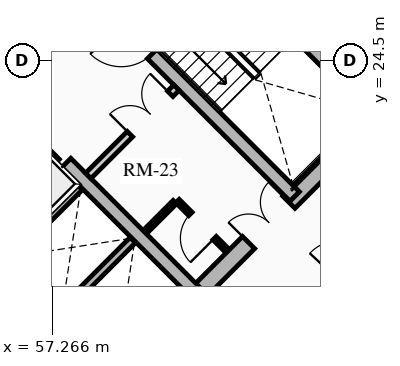
"""IFC4 building model, lengths in metres.
Left out: names, types, materials, properties, quantities, classifications, styles, units other than length and angle.
Written with IfcOpenShell. Run it as: python <this file> out.ifc"""

import sys

from ifc_helpers import new_model, si_unit, direction, frame, frame_2d, origin, place, context, subcontext, project, spatial, rectangle, extrude, source, transform, mapped, element, fill, save


model = new_model("IFC4")
c1 = context("Model", 3, precision=1e-05, world=origin(), true_north=direction((0.0, 1.0)))
c2 = subcontext(c1, "Body", "Model", "MODEL_VIEW")
j1 = project(units=[si_unit("LENGTHUNIT", "METRE"), si_unit("PLANEANGLEUNIT", "RADIAN")], contexts=[c1])
p1 = place(None, origin())
s1 = spatial("IfcSite", under=j1, at=p1, CompositionType="ELEMENT")
p2 = place(p1, origin())
s2 = spatial("IfcBuilding", under=s1, at=p2, CompositionType="ELEMENT")
p3 = place(p2, frame((0.0, 0.0, 78.88)))
s3 = spatial("IfcBuildingStorey", under=s2, at=p3, CompositionType="ELEMENT", Elevation=78.88)
for number, where, z_axis, x_axis in (
    (1, (58.737, 15.697, 0.0), (0.0, 0.0, 1.0), (-0.707, 0.707, 0.0)),
    (2, (66.303, 23.263, 0.0), (0.0, 0.0, 1.0), (-0.707, 0.707, 0.0)),
):
    element("IfcWall", number, at=place(p3, frame(where, z_axis=z_axis, x_axis=x_axis)), inside=s3, PredefinedType="SHEAR", context=c2, shape_type="SweptSolid", body=[
        extrude(rectangle(XDim=14.2, YDim=0.45, at=frame_2d((7.1, 0.0))), origin(), (0.0, 0.0, 1.0), 2.91),
    ])
p4 = place(p3, frame((58.578, 15.856, 0.0), z_axis=(0.0, 0.0, 1.0), x_axis=(0.707106781187, 0.707106781187, 0.0)))
e3 = element("IfcWall", 3, at=p4, inside=s3, PredefinedType="SHEAR", context=c2, shape_type="SweptSolid", body=[
    extrude(rectangle(XDim=10.7, YDim=0.45, at=frame_2d((5.35, 0.0))), origin(), (0.0, 0.0, 1.0), 2.91),
])
m1 = source(origin(), c2, "Body", "SweptSolid", [
    extrude(rectangle(XDim=1.5, YDim=2.02, at=frame_2d((0.75, 1.01))), frame((0.0, 0.235, 0.0), z_axis=(0.0, -1.0, 0.0), x_axis=(1.0, 0.0, 0.0)), (0.0, 0.0, 1.0), 0.47),
])
p5 = place(p4, frame((5.45, 0.0, 0.0)))
e4 = element("IfcOpeningElement", 4, at=p5, cuts=e3, PredefinedType="OPENING", context=c2, shape_type="MappedRepresentation", body=[
    mapped(m1, transform((0.0, 0.0, 0.0), x_axis=(1.0, 0.0, 0.0), y_axis=(0.0, 1.0, 0.0), z_axis=(0.0, 0.0, 1.0), scale=1.0)),
])
p6 = place(p3, frame((61.078, 18.355, 0.0), z_axis=(0.0, 0.0, 1.0), x_axis=(-0.707106781187, 0.707106781187, 0.0)))
e5 = element("IfcWall", 5, at=p6, inside=s3, PredefinedType="SHEAR", context=c2, shape_type="SweptSolid", body=[
    extrude(rectangle(XDim=13.75, YDim=0.35, at=frame_2d((6.875, 0.0))), origin(), (0.0, 0.0, 1.0), 2.91),
])
m2 = source(origin(), c2, "Body", "SweptSolid", [
    extrude(rectangle(XDim=1.1, YDim=2.015, at=frame_2d((0.55, 1.007))), frame((0.0, 0.185, 0.0), z_axis=(0.0, -1.0, 0.0), x_axis=(1.0, 0.0, 0.0)), (0.0, 0.0, 1.0), 0.37),
])
p7 = place(p6, frame((4.875, 0.0, 0.0)))
e6 = element("IfcOpeningElement", 6, at=p7, cuts=e5, PredefinedType="OPENING", context=c2, shape_type="MappedRepresentation", body=[
    mapped(m2, transform((0.0, 0.0, 0.0), x_axis=(1.0, 0.0, 0.0), y_axis=(0.0, 1.0, 0.0), z_axis=(0.0, 0.0, 1.0), scale=1.0)),
])
m3 = source(origin(), c2, "Body", "SweptSolid", [
    extrude(rectangle(XDim=1.15, YDim=2.02, at=frame_2d((0.575, 1.01))), frame((0.0, 0.185, 0.0), z_axis=(0.0, -1.0, 0.0), x_axis=(1.0, 0.0, 0.0)), (0.0, 0.0, 1.0), 0.37),
])
p8 = place(p6, frame((7.295, 0.0, 0.0)))
e7 = element("IfcOpeningElement", 7, at=p8, cuts=e5, PredefinedType="OPENING", context=c2, shape_type="MappedRepresentation", body=[
    mapped(m3, transform((0.0, 0.0, 0.0), x_axis=(1.0, 0.0, 0.0), y_axis=(0.0, 1.0, 0.0), z_axis=(0.0, 0.0, 1.0), scale=1.0)),
])
p9 = place(p3, frame((63.645, 20.922, 0.0), z_axis=(0.0, 0.0, 1.0), x_axis=(-0.707106781187, 0.707106781187, 0.0)))
e8 = element("IfcWall", 8, at=p9, inside=s3, PredefinedType="SHEAR", context=c2, shape_type="SweptSolid", body=[
    extrude(rectangle(XDim=13.75, YDim=0.35, at=frame_2d((6.875, 0.0))), origin(), (0.0, 0.0, 1.0), 2.91),
])
p10 = place(p9, frame((10.0, 0.0, 0.0)))
e9 = element("IfcOpeningElement", 9, at=p10, cuts=e8, PredefinedType="OPENING", context=c2, shape_type="MappedRepresentation", body=[
    mapped(m2, transform((0.0, 0.0, 0.0), x_axis=(1.0, 0.0, 0.0), y_axis=(0.0, 1.0, 0.0), z_axis=(0.0, 0.0, 1.0), scale=1.0)),
])
p11 = place(p9, frame((12.0, 0.0, 0.0)))
e10 = element("IfcOpeningElement", 10, at=p11, cuts=e8, PredefinedType="OPENING", context=c2, shape_type="MappedRepresentation", body=[
    mapped(m2, transform((0.0, 0.0, 0.0), x_axis=(1.0, 0.0, 0.0), y_axis=(0.0, 1.0, 0.0), z_axis=(0.0, 0.0, 1.0), scale=1.0)),
])
p12 = place(p9, frame((5.305, 0.0, 0.0)))
e11 = element("IfcOpeningElement", 11, at=p12, cuts=e8, PredefinedType="OPENING", context=c2, shape_type="MappedRepresentation", body=[
    mapped(m3, transform((0.0, 0.0, 0.0), x_axis=(1.0, 0.0, 0.0), y_axis=(0.0, 1.0, 0.0), z_axis=(0.0, 0.0, 1.0), scale=1.0)),
])
p13 = place(p3, frame((65.83, 23.107, 0.0), z_axis=(0.0, 0.0, 1.0), x_axis=(-0.707088616009, 0.707124945897, 0.0)))
e12 = element("IfcWall", 12, at=p13, inside=s3, PredefinedType="SHEAR", context=c2, shape_type="SweptSolid", body=[
    extrude(rectangle(XDim=6.72, YDim=0.35, at=frame_2d((3.36, 0.0))), origin(), (0.0, 0.0, 1.0), 2.91),
])
p14 = place(p3, frame((55.888, 19.069, 0.0), z_axis=(0.0, 0.0, 1.0), x_axis=(0.707106781187, 0.707106781187, 0.0)))
e13 = element("IfcWall", 13, at=p14, inside=s3, PredefinedType="SHEAR", context=c2, shape_type="SweptSolid", body=[
    extrude(rectangle(XDim=2.97, YDim=0.2, at=frame_2d((1.485, 0.0))), origin(), (0.0, 0.0, 1.0), 2.91),
])
p15 = place(p3, frame((57.284, 17.673, 0.0), z_axis=(0.0, 0.0, 1.0), x_axis=(0.707147878904, 0.70706568108, 0.0)))
e14 = element("IfcWall", 14, at=p15, inside=s3, PredefinedType="SHEAR", context=c2, shape_type="SweptSolid", body=[
    extrude(rectangle(XDim=2.97, YDim=0.2, at=frame_2d((1.485, 0.0))), origin(), (0.0, 0.0, 1.0), 2.91),
])
p16 = place(p3, frame((57.412, 17.97, 0.0), z_axis=(0.0, 0.0, 1.0), x_axis=(-0.707106781187, 0.707106781187, 0.0)))
e15 = element("IfcWall", 15, at=p16, inside=s3, PredefinedType="SHEAR", context=c2, shape_type="SweptSolid", body=[
    extrude(rectangle(XDim=1.735, YDim=0.2, at=frame_2d((0.867, 0.0))), origin(), (0.0, 0.0, 1.0), 2.91),
])
p17 = place(p3, frame((58.214, 21.467, 0.0), z_axis=(0.0, 0.0, 1.0), x_axis=(0.707106781187, 0.707106781187, 0.0)))
e16 = element("IfcWall", 16, at=p17, inside=s3, PredefinedType="PARTITIONING", context=c2, shape_type="SweptSolid", body=[
    extrude(rectangle(XDim=3.28, YDim=0.2, at=frame_2d((1.64, 0.0))), origin(), (0.0, 0.0, 1.0), 2.655),
])
m4 = source(origin(), c2, "Body", "SweptSolid", [
    extrude(rectangle(XDim=1.5, YDim=2.02, at=frame_2d((0.75, 1.01))), frame((0.0, 0.11, 0.0), z_axis=(0.0, -1.0, 0.0), x_axis=(1.0, 0.0, 0.0)), (0.0, 0.0, 1.0), 0.22),
])
p18 = place(p17, frame((1.55, 0.0, 0.0)))
e17 = element("IfcOpeningElement", 17, at=p18, cuts=e16, PredefinedType="OPENING", context=c2, shape_type="MappedRepresentation", body=[
    mapped(m4, transform((0.0, 0.0, 0.0), x_axis=(1.0, 0.0, 0.0), y_axis=(0.0, 1.0, 0.0), z_axis=(0.0, 0.0, 1.0), scale=1.0)),
])
p19 = place(p3, frame((54.961, 24.719, 0.0), z_axis=(0.0, 0.0, 1.0), x_axis=(0.707106781187, 0.707106781187, 0.0)))
e18 = element("IfcWall", 18, at=p19, inside=s3, PredefinedType="PARTITIONING", context=c2, shape_type="SweptSolid", body=[
    extrude(rectangle(XDim=3.28, YDim=0.2, at=frame_2d((1.64, 0.0))), origin(), (0.0, 0.0, 1.0), 2.655),
])
m5 = source(origin(), c2, "Body", "SweptSolid", [
    extrude(rectangle(XDim=0.9, YDim=2.005, at=frame_2d((0.45, 1.002))), frame((0.0, 0.11, 0.0), z_axis=(0.0, -1.0, 0.0), x_axis=(1.0, 0.0, 0.0)), (0.0, 0.0, 1.0), 0.22),
])
p20 = place(p19, frame((0.16, 0.0, 0.0)))
e19 = element("IfcOpeningElement", 19, at=p20, cuts=e18, PredefinedType="OPENING", context=c2, shape_type="MappedRepresentation", body=[
    mapped(m5, transform((0.0, 0.0, 0.0), x_axis=(1.0, 0.0, 0.0), y_axis=(0.0, 1.0, 0.0), z_axis=(0.0, 0.0, 1.0), scale=1.0)),
])
p21 = place(p3, frame((61.835, 19.529, 0.0), z_axis=(0.0, 0.0, 1.0), x_axis=(-0.707174592913, 0.707038962956, 0.0)))
e20 = element("IfcWall", 20, at=p21, inside=s3, PredefinedType="PARTITIONING", context=c2, shape_type="SweptSolid", body=[
    extrude(rectangle(XDim=1.8, YDim=0.125, at=frame_2d((0.9, 0.0))), origin(), (0.0, 0.0, 1.0), 2.655),
])
m6 = source(origin(), c2, "Body", "SweptSolid", [
    extrude(rectangle(XDim=0.9, YDim=2.005, at=frame_2d((0.45, 1.002))), frame((0.0, 0.073, 0.0), z_axis=(0.0, -1.0, 0.0), x_axis=(1.0, 0.0, 0.0)), (0.0, 0.0, 1.0), 0.145),
])
p22 = place(p21, frame((0.42, 0.0, 0.0)))
e21 = element("IfcOpeningElement", 21, at=p22, cuts=e20, PredefinedType="OPENING", context=c2, shape_type="MappedRepresentation", body=[
    mapped(m6, transform((0.0, 0.0, 0.0), x_axis=(1.0, 0.0, 0.0), y_axis=(0.0, 1.0, 0.0), z_axis=(0.0, 0.0, 1.0), scale=1.0)),
])
p23 = place(p3, frame((59.713, 19.996, 0.0), z_axis=(0.0, 0.0, 1.0), x_axis=(0.707217726, 0.706995818963, 0.0)))
e22 = element("IfcWall", 22, at=p23, inside=s3, PredefinedType="PARTITIONING", context=c2, shape_type="SweptSolid", body=[
    extrude(rectangle(XDim=1.1, YDim=0.125, at=frame_2d((0.55, 0.0))), origin(), (0.0, 0.0, 1.0), 2.655),
])
p24 = place(p3, frame((62.903, 16.667, 0.0), z_axis=(0.0, 0.0, 1.0), x_axis=(0.682371947497, 0.731005147225, 0.0)))
e23 = element("IfcWall", 23, at=p24, inside=s3, PredefinedType="PARTITIONING", context=c2, shape_type="SweptSolid", body=[
    extrude(rectangle(XDim=6.642, YDim=0.15, at=frame_2d((3.321, 0.0))), origin(), (0.0, 0.0, 1.0), 2.225),
])
m7 = source(origin(), c2, "Body", "SweptSolid", [
    extrude(rectangle(XDim=1.05, YDim=2.015, at=frame_2d((0.525, 1.007))), frame((0.0, 0.085, 0.0), z_axis=(0.0, -1.0, 0.0), x_axis=(1.0, 0.0, 0.0)), (0.0, 0.0, 1.0), 0.17),
])
p25 = place(p24, frame((2.796, 0.0, 0.0)))
e24 = element("IfcOpeningElement", 24, at=p25, cuts=e23, PredefinedType="OPENING", context=c2, shape_type="MappedRepresentation", body=[
    mapped(m7, transform((0.0, 0.0, 0.0), x_axis=(1.0, 0.0, 0.0), y_axis=(0.0, 1.0, 0.0), z_axis=(0.0, 0.0, 1.0), scale=1.0)),
])
m8 = source(origin(), c2, "Body", "SweptSolid", [
    extrude(rectangle(XDim=1.1, YDim=2.015, at=frame_2d((0.55, 1.007))), frame((0.0, 0.025, 0.0), z_axis=(0.0, -1.0, 0.0), x_axis=(1.0, 0.0, 0.0)), (0.0, 0.0, 1.0), 0.05),
])
p26 = place(p7, origin())
e25 = element("IfcDoor", 25, at=p26, inside=s3, OperationType="SLIDING_TO_RIGHT", PredefinedType="DOOR", context=c2, shape_type="MappedRepresentation", body=[
    mapped(m8, transform((0.0, 0.0, 0.0), x_axis=(1.0, 0.0, 0.0), y_axis=(0.0, 1.0, 0.0), z_axis=(0.0, 0.0, 1.0), scale=1.0)),
])
fill(e6, e25)
m9 = source(origin(), c2, "Body", "SweptSolid", [
    extrude(rectangle(XDim=1.15, YDim=2.02, at=frame_2d((0.575, 1.01))), frame((0.0, 0.025, 0.0), z_axis=(0.0, -1.0, 0.0), x_axis=(1.0, 0.0, 0.0)), (0.0, 0.0, 1.0), 0.05),
])
p27 = place(p12, origin())
e26 = element("IfcDoor", 26, at=p27, inside=s3, OperationType="SINGLE_SWING_RIGHT", PredefinedType="DOOR", context=c2, shape_type="MappedRepresentation", body=[
    mapped(m9, transform((0.0, 0.0, 0.0), x_axis=(1.0, 0.0, 0.0), y_axis=(0.0, 1.0, 0.0), z_axis=(0.0, 0.0, 1.0), scale=1.0)),
])
fill(e11, e26)
m10 = source(origin(), c2, "Body", "SweptSolid", [
    extrude(rectangle(XDim=1.5, YDim=2.02, at=frame_2d((0.75, 1.01))), frame((0.0, 0.025, 0.0), z_axis=(0.0, -1.0, 0.0), x_axis=(1.0, 0.0, 0.0)), (0.0, 0.0, 1.0), 0.05),
])
p28 = place(p5, origin())
e27 = element("IfcDoor", 27, at=p28, inside=s3, OperationType="DOUBLE_DOOR_SINGLE_SWING", PredefinedType="DOOR", context=c2, shape_type="MappedRepresentation", body=[
    mapped(m10, transform((0.0, 0.0, 0.0), x_axis=(1.0, 0.0, 0.0), y_axis=(0.0, 1.0, 0.0), z_axis=(0.0, 0.0, 1.0), scale=1.0)),
])
fill(e4, e27)
p29 = place(p18, origin())
e28 = element("IfcDoor", 28, at=p29, inside=s3, OperationType="DOUBLE_DOOR_SINGLE_SWING", PredefinedType="DOOR", context=c2, shape_type="MappedRepresentation", body=[
    mapped(m10, transform((0.0, 0.0, 0.0), x_axis=(1.0, 0.0, 0.0), y_axis=(0.0, 1.0, 0.0), z_axis=(0.0, 0.0, 1.0), scale=1.0)),
])
fill(e17, e28)
m11 = source(origin(), c2, "Body", "SweptSolid", [
    extrude(rectangle(XDim=0.9, YDim=2.005, at=frame_2d((0.45, 1.002))), frame((0.0, 0.025, 0.0), z_axis=(0.0, -1.0, 0.0), x_axis=(1.0, 0.0, 0.0)), (0.0, 0.0, 1.0), 0.05),
])
p30 = place(p22, origin())
e29 = element("IfcDoor", 29, at=p30, inside=s3, OperationType="SINGLE_SWING_LEFT", PredefinedType="DOOR", context=c2, shape_type="MappedRepresentation", body=[
    mapped(m11, transform((0.0, 0.0, 0.0), x_axis=(1.0, 0.0, 0.0), y_axis=(0.0, 1.0, 0.0), z_axis=(0.0, 0.0, 1.0), scale=1.0)),
])
fill(e21, e29)
save(model, sys.argv[1])
